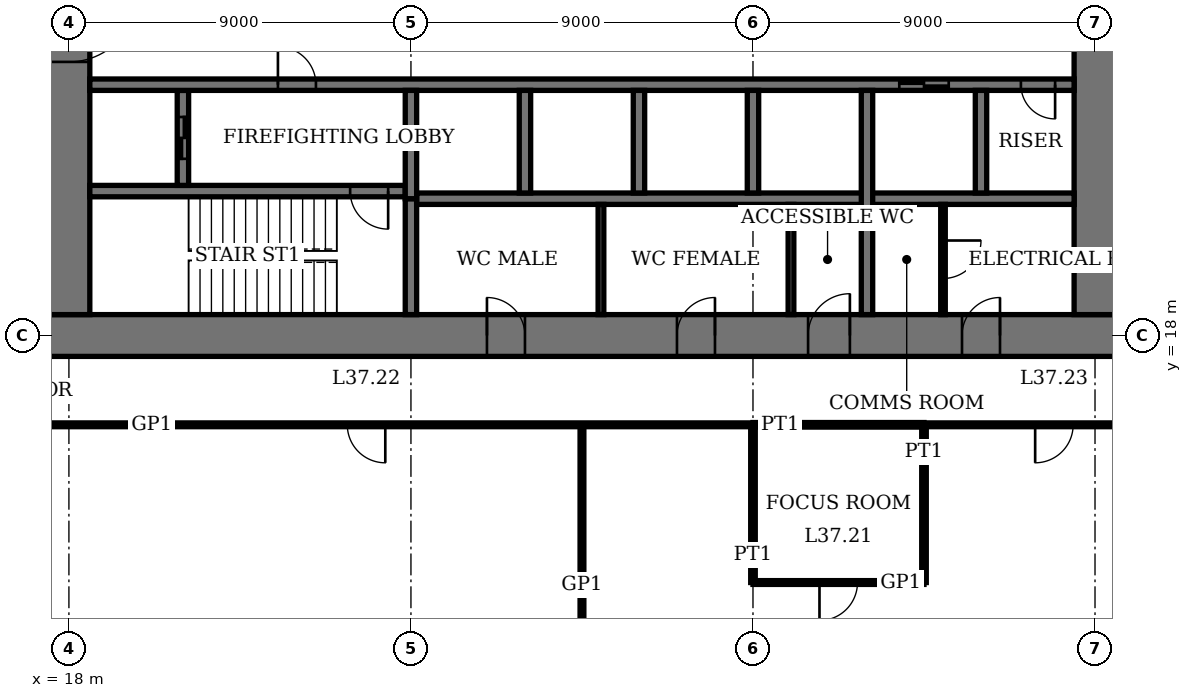
"""IFC4 building model, lengths in metres.
Left out: names, types, materials, properties, quantities, classifications, styles, units other than length and angle.
Written with IfcOpenShell. Run it as: python <this file> out.ifc"""

import sys

from ifc_helpers import new_model, si_unit, direction, frame, frame_2d, origin, place, context, subcontext, project, spatial, rectangle, extrude, element, fill, save


model = new_model("IFC4")
c1 = context("Model", 3, precision=1e-05, world=origin(), true_north=direction((0.0, 1.0)))
c2 = subcontext(c1, "Body", "Model", "MODEL_VIEW")
j1 = project(units=[si_unit("LENGTHUNIT", "METRE"), si_unit("PLANEANGLEUNIT", "RADIAN")], contexts=[c1])
p1 = place(None, origin())
s1 = spatial("IfcSite", under=j1, at=p1, CompositionType="ELEMENT")
p2 = place(p1, origin())
s2 = spatial("IfcBuilding", under=s1, at=p2, CompositionType="ELEMENT")
p3 = place(p2, frame((0.0, 0.0, 153.0)))
s3 = spatial("IfcBuildingStorey", under=s2, at=p3, CompositionType="ELEMENT", Elevation=153.0)
p4 = place(p3, frame((17.45, 18.0, 0.0), z_axis=(0.0, 0.0, 1.0), x_axis=(1.0, 0.0, 0.0)))
e1 = element("IfcWall", 1, at=p4, inside=s3, PredefinedType="SHEAR", context=c2, shape_type="SweptSolid", body=[
    extrude(rectangle(XDim=28.1, YDim=1.1, at=frame_2d((14.05, 0.0))), origin(), (0.0, 0.0, 1.0), 4.2),
])
p5 = place(p4, frame((11.55, 0.0, 0.0)))
e2 = element("IfcOpeningElement", 2, at=p5, cuts=e1, PredefinedType="OPENING", context=c2, shape_type="SweptSolid", body=[
    extrude(rectangle(XDim=1.0, YDim=2.4, at=frame_2d((0.5, 1.2))), frame((0.0, 0.56, 0.0), z_axis=(0.0, -1.0, 0.0), x_axis=(1.0, 0.0, 0.0)), (0.0, 0.0, 1.0), 1.12),
])
p6 = place(p4, frame((16.55, 0.0, 0.0)))
e3 = element("IfcOpeningElement", 3, at=p6, cuts=e1, PredefinedType="OPENING", context=c2, shape_type="SweptSolid", body=[
    extrude(rectangle(XDim=1.0, YDim=2.4, at=frame_2d((0.5, 1.2))), frame((0.0, 0.56, 0.0), z_axis=(0.0, -1.0, 0.0), x_axis=(1.0, 0.0, 0.0)), (0.0, 0.0, 1.0), 1.12),
])
p7 = place(p4, frame((20.0, 0.0, 0.0)))
e4 = element("IfcOpeningElement", 4, at=p7, cuts=e1, PredefinedType="OPENING", context=c2, shape_type="SweptSolid", body=[
    extrude(rectangle(XDim=1.1, YDim=2.4, at=frame_2d((0.55, 1.2))), frame((0.0, 0.56, 0.0), z_axis=(0.0, -1.0, 0.0), x_axis=(1.0, 0.0, 0.0)), (0.0, 0.0, 1.0), 1.12),
])
p8 = place(p4, frame((24.05, 0.0, 0.0)))
e5 = element("IfcOpeningElement", 5, at=p8, cuts=e1, PredefinedType="OPENING", context=c2, shape_type="SweptSolid", body=[
    extrude(rectangle(XDim=1.0, YDim=2.4, at=frame_2d((0.5, 1.2))), frame((0.0, 0.56, 0.0), z_axis=(0.0, -1.0, 0.0), x_axis=(1.0, 0.0, 0.0)), (0.0, 0.0, 1.0), 1.12),
])
p9 = place(p3, frame((18.0, 35.45, 0.0), z_axis=(0.0, 0.0, 1.0), x_axis=(0.0, -1.0, 0.0)))
e6 = element("IfcWall", 6, at=p9, inside=s3, PredefinedType="SHEAR", context=c2, shape_type="SweptSolid", body=[
    extrude(rectangle(XDim=16.9, YDim=1.1, at=frame_2d((8.45, 0.0))), origin(), (0.0, 0.0, 1.0), 4.2),
])
p10 = place(p9, frame((8.45, 0.0, 0.0)))
e7 = element("IfcOpeningElement", 7, at=p10, cuts=e6, PredefinedType="OPENING", context=c2, shape_type="SweptSolid", body=[
    extrude(rectangle(XDim=1.8, YDim=2.4, at=frame_2d((0.9, 1.2))), frame((0.0, 0.56, 0.0), z_axis=(0.0, -1.0, 0.0), x_axis=(1.0, 0.0, 0.0)), (0.0, 0.0, 1.0), 1.12),
])
p11 = place(p3, frame((45.0, 18.55, 0.0), z_axis=(0.0, 0.0, 1.0), x_axis=(0.0, 1.0, 0.0)))
e8 = element("IfcWall", 8, at=p11, inside=s3, PredefinedType="SHEAR", context=c2, shape_type="SweptSolid", body=[
    extrude(rectangle(XDim=16.9, YDim=1.1, at=frame_2d((8.45, 0.0))), origin(), (0.0, 0.0, 1.0), 4.2),
])
p12 = place(p11, frame((8.45, 0.0, 0.0)))
e9 = element("IfcOpeningElement", 9, at=p12, cuts=e8, PredefinedType="OPENING", context=c2, shape_type="SweptSolid", body=[
    extrude(rectangle(XDim=1.8, YDim=2.4, at=frame_2d((0.9, 1.2))), frame((0.0, 0.56, 0.0), z_axis=(0.0, -1.0, 0.0), x_axis=(1.0, 0.0, 0.0)), (0.0, 0.0, 1.0), 1.12),
])
p13 = place(p3, frame((18.55, 21.8, 0.0), z_axis=(0.0, 0.0, 1.0), x_axis=(1.0, 0.0, 0.0)))
e10 = element("IfcWall", 10, at=p13, inside=s3, PredefinedType="SHEAR", context=c2, shape_type="SweptSolid", body=[
    extrude(rectangle(XDim=8.3, YDim=0.3, at=frame_2d((4.15, 0.0))), origin(), (0.0, 0.0, 1.0), 4.2),
])
p14 = place(p13, frame((6.85, 0.0, 0.0)))
e11 = element("IfcOpeningElement", 11, at=p14, cuts=e10, PredefinedType="OPENING", context=c2, shape_type="SweptSolid", body=[
    extrude(rectangle(XDim=1.0, YDim=2.4, at=frame_2d((0.5, 1.2))), frame((0.0, 0.16, 0.0), z_axis=(0.0, -1.0, 0.0), x_axis=(1.0, 0.0, 0.0)), (0.0, 0.0, 1.0), 0.32),
])
p15 = place(p3, frame((27.0, 18.55, 0.0), z_axis=(0.0, 0.0, 1.0), x_axis=(0.0, 1.0, 0.0)))
e12 = element("IfcWall", 12, at=p15, inside=s3, PredefinedType="SHEAR", context=c2, shape_type="SweptSolid", body=[
    extrude(rectangle(XDim=3.05, YDim=0.3, at=frame_2d((1.525, 0.0))), origin(), (0.0, 0.0, 1.0), 4.2),
])
p16 = place(p3, frame((21.0, 21.95, 0.0), z_axis=(0.0, 0.0, 1.0), x_axis=(0.0, 1.0, 0.0)))
e13 = element("IfcWall", 13, at=p16, inside=s3, PredefinedType="SHEAR", context=c2, shape_type="SweptSolid", body=[
    extrude(rectangle(XDim=2.5, YDim=0.3, at=frame_2d((1.25, 0.0))), origin(), (0.0, 0.0, 1.0), 4.2),
])
p17 = place(p16, frame((0.7, 0.0, 0.0)))
e14 = element("IfcOpeningElement", 14, at=p17, cuts=e13, PredefinedType="OPENING", context=c2, shape_type="SweptSolid", body=[
    extrude(rectangle(XDim=1.1, YDim=2.4, at=frame_2d((0.55, 1.2))), frame((0.0, 0.16, 0.0), z_axis=(0.0, -1.0, 0.0), x_axis=(1.0, 0.0, 0.0)), (0.0, 0.0, 1.0), 0.32),
])
p18 = place(p3, frame((18.55, 24.6, 0.0), z_axis=(0.0, 0.0, 1.0), x_axis=(1.0, 0.0, 0.0)))
e15 = element("IfcWall", 15, at=p18, inside=s3, PredefinedType="SHEAR", context=c2, shape_type="SweptSolid", body=[
    extrude(rectangle(XDim=25.9, YDim=0.3, at=frame_2d((12.95, 0.0))), origin(), (0.0, 0.0, 1.0), 4.2),
])
p19 = place(p18, frame((4.95, 0.0, 0.0)))
e16 = element("IfcOpeningElement", 16, at=p19, cuts=e15, PredefinedType="OPENING", context=c2, shape_type="SweptSolid", body=[
    extrude(rectangle(XDim=1.0, YDim=2.4, at=frame_2d((0.5, 1.2))), frame((0.0, 0.16, 0.0), z_axis=(0.0, -1.0, 0.0), x_axis=(1.0, 0.0, 0.0)), (0.0, 0.0, 1.0), 0.32),
])
p20 = place(p18, frame((24.5, 0.0, 0.0)))
e17 = element("IfcOpeningElement", 17, at=p20, cuts=e15, PredefinedType="OPENING", context=c2, shape_type="SweptSolid", body=[
    extrude(rectangle(XDim=0.9, YDim=2.1, at=frame_2d((0.45, 1.05))), frame((0.0, 0.16, 0.0), z_axis=(0.0, -1.0, 0.0), x_axis=(1.0, 0.0, 0.0)), (0.0, 0.0, 1.0), 0.32),
])
p21 = place(p18, frame((21.3, 0.0, 0.0)))
e18 = element("IfcOpeningElement", 18, at=p21, cuts=e15, PredefinedType="OPENING", context=c2, shape_type="SweptSolid", body=[
    extrude(rectangle(XDim=1.3, YDim=2.4, at=frame_2d((0.65, 1.2))), frame((0.0, 0.16, 0.0), z_axis=(0.0, -1.0, 0.0), x_axis=(1.0, 0.0, 0.0)), (0.0, 0.0, 1.0), 0.32),
])
p22 = place(p3, frame((27.15, 21.6, 0.0), z_axis=(0.0, 0.0, 1.0), x_axis=(1.0, 0.0, 0.0)))
e19 = element("IfcWall", 19, at=p22, inside=s3, PredefinedType="SHEAR", context=c2, shape_type="SweptSolid", body=[
    extrude(rectangle(XDim=17.3, YDim=0.3, at=frame_2d((8.65, 0.0))), origin(), (0.0, 0.0, 1.0), 4.2),
])
for number, where, z_axis, x_axis in (
    (20, (30.0, 21.75, 0.0), (0.0, 0.0, 1.0), (0.0, 1.0, 0.0)),
    (21, (33.0, 21.75, 0.0), (0.0, 0.0, 1.0), (0.0, 1.0, 0.0)),
    (22, (36.0, 21.75, 0.0), (0.0, 0.0, 1.0), (0.0, 1.0, 0.0)),
):
    element("IfcWall", number, at=place(p3, frame(where, z_axis=z_axis, x_axis=x_axis)), inside=s3, PredefinedType="SHEAR", context=c2, shape_type="SweptSolid", body=[
        extrude(rectangle(XDim=2.7, YDim=0.3, at=frame_2d((1.35, 0.0))), origin(), (0.0, 0.0, 1.0), 4.2),
    ])
p23 = place(p3, frame((39.0, 18.55, 0.0), z_axis=(0.0, 0.0, 1.0), x_axis=(0.0, 1.0, 0.0)))
e23 = element("IfcWall", 23, at=p23, inside=s3, PredefinedType="SHEAR", context=c2, shape_type="SweptSolid", body=[
    extrude(rectangle(XDim=5.9, YDim=0.3, at=frame_2d((2.95, 0.0))), origin(), (0.0, 0.0, 1.0), 4.2),
])
p24 = place(p3, frame((42.0, 21.75, 0.0), z_axis=(0.0, 0.0, 1.0), x_axis=(0.0, 1.0, 0.0)))
e24 = element("IfcWall", 24, at=p24, inside=s3, PredefinedType="SHEAR", context=c2, shape_type="SweptSolid", body=[
    extrude(rectangle(XDim=2.7, YDim=0.3, at=frame_2d((1.35, 0.0))), origin(), (0.0, 0.0, 1.0), 4.2),
])
p25 = place(p3, frame((27.0, 21.6, 0.0), z_axis=(0.0, 0.0, 1.0), x_axis=(0.0, 1.0, 0.0)))
e25 = element("IfcWall", 25, at=p25, inside=s3, PredefinedType="SHEAR", context=c2, shape_type="SweptSolid", body=[
    extrude(rectangle(XDim=2.85, YDim=0.3, at=frame_2d((1.425, 0.0))), origin(), (0.0, 0.0, 1.0), 4.2),
])
p26 = place(p3, frame((36.0, 11.5, 0.0), z_axis=(0.0, 0.0, 1.0), x_axis=(1.0, 0.0, 0.0)))
e26 = element("IfcWall", 26, at=p26, inside=s3, PredefinedType="PARTITIONING", context=c2, shape_type="SweptSolid", body=[
    extrude(rectangle(XDim=4.5, YDim=0.1, at=frame_2d((2.25, 0.0))), origin(), (0.0, 0.0, 1.0), 3.85),
])
p27 = place(p26, frame((1.75, 0.0, 0.0)))
e27 = element("IfcOpeningElement", 27, at=p27, cuts=e26, PredefinedType="OPENING", context=c2, shape_type="SweptSolid", body=[
    extrude(rectangle(XDim=1.0, YDim=2.4, at=frame_2d((0.5, 1.2))), frame((0.0, 0.06, 0.0), z_axis=(0.0, -1.0, 0.0), x_axis=(1.0, 0.0, 0.0)), (0.0, 0.0, 1.0), 0.12),
])
p28 = place(p3, frame((36.0, 15.65, 0.0), z_axis=(0.0, 0.0, 1.0), x_axis=(1.0, 0.0, 0.0)))
e28 = element("IfcWall", 28, at=p28, inside=s3, PredefinedType="PARTITIONING", context=c2, shape_type="SweptSolid", body=[
    extrude(rectangle(XDim=4.5, YDim=0.12, at=frame_2d((2.25, 0.0))), origin(), (0.0, 0.0, 1.0), 3.85),
])
p29 = place(p3, frame((15.65, 15.65, 0.0), z_axis=(0.0, 0.0, 1.0), x_axis=(1.0, 0.0, 0.0)))
e29 = element("IfcWall", 29, at=p29, inside=s3, PredefinedType="PARTITIONING", context=c2, shape_type="SweptSolid", body=[
    extrude(rectangle(XDim=20.35, YDim=0.1, at=frame_2d((10.175, 0.0))), origin(), (0.0, 0.0, 1.0), 3.85),
])
p30 = place(p29, frame((9.675, 0.0, 0.0)))
e30 = element("IfcOpeningElement", 30, at=p30, cuts=e29, PredefinedType="OPENING", context=c2, shape_type="SweptSolid", body=[
    extrude(rectangle(XDim=1.0, YDim=2.4, at=frame_2d((0.5, 1.2))), frame((0.0, 0.06, 0.0), z_axis=(0.0, -1.0, 0.0), x_axis=(1.0, 0.0, 0.0)), (0.0, 0.0, 1.0), 0.12),
])
p31 = place(p3, frame((40.5, 15.65, 0.0), z_axis=(0.0, 0.0, 1.0), x_axis=(1.0, 0.0, 0.0)))
e31 = element("IfcWall", 31, at=p31, inside=s3, PredefinedType="PARTITIONING", context=c2, shape_type="SweptSolid", body=[
    extrude(rectangle(XDim=6.85, YDim=0.1, at=frame_2d((3.425, 0.0))), origin(), (0.0, 0.0, 1.0), 3.85),
])
p32 = place(p31, frame((2.925, 0.0, 0.0)))
e32 = element("IfcOpeningElement", 32, at=p32, cuts=e31, PredefinedType="OPENING", context=c2, shape_type="SweptSolid", body=[
    extrude(rectangle(XDim=1.0, YDim=2.4, at=frame_2d((0.5, 1.2))), frame((0.0, 0.06, 0.0), z_axis=(0.0, -1.0, 0.0), x_axis=(1.0, 0.0, 0.0)), (0.0, 0.0, 1.0), 0.12),
])
p33 = place(p3, frame((31.5, 7.2, 0.0), z_axis=(0.0, 0.0, 1.0), x_axis=(0.0, 1.0, 0.0)))
e33 = element("IfcWall", 33, at=p33, inside=s3, PredefinedType="PARTITIONING", context=c2, shape_type="SweptSolid", body=[
    extrude(rectangle(XDim=8.45, YDim=0.1, at=frame_2d((4.225, 0.0))), origin(), (0.0, 0.0, 1.0), 3.85),
])
p34 = place(p3, frame((36.0, 11.5, 0.0), z_axis=(0.0, 0.0, 1.0), x_axis=(0.0, 1.0, 0.0)))
e34 = element("IfcWall", 34, at=p34, inside=s3, PredefinedType="PARTITIONING", context=c2, shape_type="SweptSolid", body=[
    extrude(rectangle(XDim=4.15, YDim=0.12, at=frame_2d((2.075, 0.0))), origin(), (0.0, 0.0, 1.0), 3.25),
])
p35 = place(p3, frame((40.5, 11.5, 0.0), z_axis=(0.0, 0.0, 1.0), x_axis=(0.0, 1.0, 0.0)))
e35 = element("IfcWall", 35, at=p35, inside=s3, PredefinedType="PARTITIONING", context=c2, shape_type="SweptSolid", body=[
    extrude(rectangle(XDim=4.15, YDim=0.12, at=frame_2d((2.075, 0.0))), origin(), (0.0, 0.0, 1.0), 3.85),
])
for number, where, z_axis, x_axis in (
    (36, (32.0, 18.55, 0.0), (0.0, 0.0, 1.0), (0.0, 1.0, 0.0)),
    (37, (37.0, 18.55, 0.0), (0.0, 0.0, 1.0), (0.0, 1.0, 0.0)),
):
    element("IfcWall", number, at=place(p3, frame(where, z_axis=z_axis, x_axis=x_axis)), inside=s3, PredefinedType="PARTITIONING", context=c2, shape_type="SweptSolid", body=[
        extrude(rectangle(XDim=2.9, YDim=0.15, at=frame_2d((1.45, 0.0))), origin(), (0.0, 0.0, 1.0), 3.85),
    ])
p36 = place(p3, frame((41.0, 18.55, 0.0), z_axis=(0.0, 0.0, 1.0), x_axis=(0.0, 1.0, 0.0)))
e38 = element("IfcWall", 38, at=p36, inside=s3, PredefinedType="PARTITIONING", context=c2, shape_type="SweptSolid", body=[
    extrude(rectangle(XDim=2.9, YDim=0.12, at=frame_2d((1.45, 0.0))), origin(), (0.0, 0.0, 1.0), 3.85),
])
p37 = place(p36, frame((0.95, 0.0, 0.0)))
e39 = element("IfcOpeningElement", 39, at=p37, cuts=e38, PredefinedType="OPENING", context=c2, shape_type="SweptSolid", body=[
    extrude(rectangle(XDim=1.0, YDim=2.4, at=frame_2d((0.5, 1.2))), frame((0.0, 0.07, 0.0), z_axis=(0.0, -1.0, 0.0), x_axis=(1.0, 0.0, 0.0)), (0.0, 0.0, 1.0), 0.14),
])
p38 = place(p10, origin())
e40 = element("IfcDoor", 40, at=p38, inside=s3, OperationType="DOUBLE_DOOR_DOUBLE_SWING", PredefinedType="DOOR", context=c2, shape_type="SweptSolid", body=[
    extrude(rectangle(XDim=1.8, YDim=2.4, at=frame_2d((0.9, 1.2))), frame((0.0, 0.03, 0.0), z_axis=(0.0, -1.0, 0.0), x_axis=(1.0, 0.0, 0.0)), (0.0, 0.0, 1.0), 0.06),
    extrude(rectangle(XDim=0.04, YDim=2.4, at=frame_2d((0.02, 1.2))), frame((0.0, 0.55, 0.0), z_axis=(0.0, -1.0, 0.0), x_axis=(1.0, 0.0, 0.0)), (0.0, 0.0, 1.0), 1.1),
    extrude(rectangle(XDim=0.04, YDim=2.4, at=frame_2d((1.78, 1.2))), frame((0.0, 0.55, 0.0), z_axis=(0.0, -1.0, 0.0), x_axis=(1.0, 0.0, 0.0)), (0.0, 0.0, 1.0), 1.1),
    extrude(rectangle(XDim=1.8, YDim=0.04, at=frame_2d((0.9, 2.38))), frame((0.0, 0.55, 0.0), z_axis=(0.0, -1.0, 0.0), x_axis=(1.0, 0.0, 0.0)), (0.0, 0.0, 1.0), 1.1),
])
fill(e7, e40)
p39 = place(p5, origin())
e41 = element("IfcDoor", 41, at=p39, inside=s3, OperationType="SINGLE_SWING_RIGHT", PredefinedType="DOOR", context=c2, shape_type="SweptSolid", body=[
    extrude(rectangle(XDim=1.0, YDim=2.4, at=frame_2d((0.5, 1.2))), frame((0.0, 0.025, 0.0), z_axis=(0.0, -1.0, 0.0), x_axis=(1.0, 0.0, 0.0)), (0.0, 0.0, 1.0), 0.05),
    extrude(rectangle(XDim=0.04, YDim=2.4, at=frame_2d((0.02, 1.2))), frame((0.0, 0.4, 0.0), z_axis=(0.0, -1.0, 0.0), x_axis=(1.0, 0.0, 0.0)), (0.0, 0.0, 1.0), 0.8),
    extrude(rectangle(XDim=0.04, YDim=2.4, at=frame_2d((0.98, 1.2))), frame((0.0, 0.4, 0.0), z_axis=(0.0, -1.0, 0.0), x_axis=(1.0, 0.0, 0.0)), (0.0, 0.0, 1.0), 0.8),
    extrude(rectangle(XDim=1.0, YDim=0.04, at=frame_2d((0.5, 2.38))), frame((0.0, 0.4, 0.0), z_axis=(0.0, -1.0, 0.0), x_axis=(1.0, 0.0, 0.0)), (0.0, 0.0, 1.0), 0.8),
])
fill(e2, e41)
p40 = place(p6, origin())
e42 = element("IfcDoor", 42, at=p40, inside=s3, OperationType="SINGLE_SWING_LEFT", PredefinedType="DOOR", context=c2, shape_type="SweptSolid", body=[
    extrude(rectangle(XDim=1.0, YDim=2.4, at=frame_2d((0.5, 1.2))), frame((0.0, 0.025, 0.0), z_axis=(0.0, -1.0, 0.0), x_axis=(1.0, 0.0, 0.0)), (0.0, 0.0, 1.0), 0.05),
    extrude(rectangle(XDim=0.04, YDim=2.4, at=frame_2d((0.02, 1.2))), frame((0.0, 0.4, 0.0), z_axis=(0.0, -1.0, 0.0), x_axis=(1.0, 0.0, 0.0)), (0.0, 0.0, 1.0), 0.8),
    extrude(rectangle(XDim=0.04, YDim=2.4, at=frame_2d((0.98, 1.2))), frame((0.0, 0.4, 0.0), z_axis=(0.0, -1.0, 0.0), x_axis=(1.0, 0.0, 0.0)), (0.0, 0.0, 1.0), 0.8),
    extrude(rectangle(XDim=1.0, YDim=0.04, at=frame_2d((0.5, 2.38))), frame((0.0, 0.4, 0.0), z_axis=(0.0, -1.0, 0.0), x_axis=(1.0, 0.0, 0.0)), (0.0, 0.0, 1.0), 0.8),
])
fill(e3, e42)
p41 = place(p7, origin())
e43 = element("IfcDoor", 43, at=p41, inside=s3, OperationType="SINGLE_SWING_LEFT", PredefinedType="DOOR", context=c2, shape_type="SweptSolid", body=[
    extrude(rectangle(XDim=1.1, YDim=2.4, at=frame_2d((0.55, 1.2))), frame((0.0, 0.025, 0.0), z_axis=(0.0, -1.0, 0.0), x_axis=(1.0, 0.0, 0.0)), (0.0, 0.0, 1.0), 0.05),
    extrude(rectangle(XDim=0.04, YDim=2.4, at=frame_2d((0.02, 1.2))), frame((0.0, 0.44, 0.0), z_axis=(0.0, -1.0, 0.0), x_axis=(1.0, 0.0, 0.0)), (0.0, 0.0, 1.0), 0.88),
    extrude(rectangle(XDim=0.04, YDim=2.4, at=frame_2d((1.08, 1.2))), frame((0.0, 0.44, 0.0), z_axis=(0.0, -1.0, 0.0), x_axis=(1.0, 0.0, 0.0)), (0.0, 0.0, 1.0), 0.88),
    extrude(rectangle(XDim=1.1, YDim=0.04, at=frame_2d((0.55, 2.38))), frame((0.0, 0.44, 0.0), z_axis=(0.0, -1.0, 0.0), x_axis=(1.0, 0.0, 0.0)), (0.0, 0.0, 1.0), 0.88),
])
fill(e4, e43)
p42 = place(p8, origin())
e44 = element("IfcDoor", 44, at=p42, inside=s3, OperationType="SINGLE_SWING_LEFT", PredefinedType="DOOR", context=c2, shape_type="SweptSolid", body=[
    extrude(rectangle(XDim=1.0, YDim=2.4, at=frame_2d((0.5, 1.2))), frame((0.0, 0.025, 0.0), z_axis=(0.0, -1.0, 0.0), x_axis=(1.0, 0.0, 0.0)), (0.0, 0.0, 1.0), 0.05),
    extrude(rectangle(XDim=0.04, YDim=2.4, at=frame_2d((0.02, 1.2))), frame((0.0, 0.4, 0.0), z_axis=(0.0, -1.0, 0.0), x_axis=(1.0, 0.0, 0.0)), (0.0, 0.0, 1.0), 0.8),
    extrude(rectangle(XDim=0.04, YDim=2.4, at=frame_2d((0.98, 1.2))), frame((0.0, 0.4, 0.0), z_axis=(0.0, -1.0, 0.0), x_axis=(1.0, 0.0, 0.0)), (0.0, 0.0, 1.0), 0.8),
    extrude(rectangle(XDim=1.0, YDim=0.04, at=frame_2d((0.5, 2.38))), frame((0.0, 0.4, 0.0), z_axis=(0.0, -1.0, 0.0), x_axis=(1.0, 0.0, 0.0)), (0.0, 0.0, 1.0), 0.8),
])
fill(e5, e44)
p43 = place(p14, origin())
e45 = element("IfcDoor", 45, at=p43, inside=s3, OperationType="SINGLE_SWING_RIGHT", PredefinedType="DOOR", context=c2, shape_type="SweptSolid", body=[
    extrude(rectangle(XDim=1.0, YDim=2.4, at=frame_2d((0.5, 1.2))), frame((0.0, 0.03, 0.0), z_axis=(0.0, -1.0, 0.0), x_axis=(1.0, 0.0, 0.0)), (0.0, 0.0, 1.0), 0.06),
])
fill(e11, e45)
p44 = place(p19, origin())
e46 = element("IfcDoor", 46, at=p44, inside=s3, OperationType="SINGLE_SWING_RIGHT", PredefinedType="DOOR", context=c2, shape_type="SweptSolid", body=[
    extrude(rectangle(XDim=1.0, YDim=2.4, at=frame_2d((0.5, 1.2))), frame((0.0, 0.03, 0.0), z_axis=(0.0, -1.0, 0.0), x_axis=(1.0, 0.0, 0.0)), (0.0, 0.0, 1.0), 0.06),
])
fill(e16, e46)
p45 = place(p20, origin())
e47 = element("IfcDoor", 47, at=p45, inside=s3, OperationType="SINGLE_SWING_RIGHT", PredefinedType="DOOR", context=c2, shape_type="SweptSolid", body=[
    extrude(rectangle(XDim=0.9, YDim=2.1, at=frame_2d((0.45, 1.05))), frame((0.0, 0.03, 0.0), z_axis=(0.0, -1.0, 0.0), x_axis=(1.0, 0.0, 0.0)), (0.0, 0.0, 1.0), 0.06),
])
fill(e17, e47)
p46 = place(p27, origin())
e48 = element("IfcDoor", 48, at=p46, inside=s3, OperationType="SINGLE_SWING_LEFT", PredefinedType="DOOR", context=c2, shape_type="SweptSolid", body=[
    extrude(rectangle(XDim=1.0, YDim=2.4, at=frame_2d((0.5, 1.2))), frame((0.0, 0.02, 0.0), z_axis=(0.0, -1.0, 0.0), x_axis=(1.0, 0.0, 0.0)), (0.0, 0.0, 1.0), 0.04),
])
fill(e27, e48)
p47 = place(p30, origin())
e49 = element("IfcDoor", 49, at=p47, inside=s3, OperationType="SINGLE_SWING_RIGHT", PredefinedType="DOOR", context=c2, shape_type="SweptSolid", body=[
    extrude(rectangle(XDim=1.0, YDim=2.4, at=frame_2d((0.5, 1.2))), frame((0.0, 0.02, 0.0), z_axis=(0.0, -1.0, 0.0), x_axis=(1.0, 0.0, 0.0)), (0.0, 0.0, 1.0), 0.04),
])
fill(e30, e49)
p48 = place(p32, origin())
e50 = element("IfcDoor", 50, at=p48, inside=s3, OperationType="SINGLE_SWING_LEFT", PredefinedType="DOOR", context=c2, shape_type="SweptSolid", body=[
    extrude(rectangle(XDim=1.0, YDim=2.4, at=frame_2d((0.5, 1.2))), frame((0.0, 0.02, 0.0), z_axis=(0.0, -1.0, 0.0), x_axis=(1.0, 0.0, 0.0)), (0.0, 0.0, 1.0), 0.04),
])
fill(e32, e50)
p49 = place(p37, origin())
e51 = element("IfcDoor", 51, at=p49, inside=s3, OperationType="SINGLE_SWING_RIGHT", PredefinedType="DOOR", context=c2, shape_type="SweptSolid", body=[
    extrude(rectangle(XDim=1.0, YDim=2.4, at=frame_2d((0.5, 1.2))), frame((0.0, 0.03, 0.0), z_axis=(0.0, -1.0, 0.0), x_axis=(1.0, 0.0, 0.0)), (0.0, 0.0, 1.0), 0.06),
])
fill(e39, e51)
p50 = place(p21, origin())
e52 = element("IfcDoor", 52, at=p50, inside=s3, OperationType="DOUBLE_DOOR_SLIDING", PredefinedType="DOOR", context=c2, shape_type="SweptSolid", body=[
    extrude(rectangle(XDim=1.3, YDim=2.4, at=frame_2d((0.65, 1.2))), frame((0.0, 0.02, 0.0), z_axis=(0.0, -1.0, 0.0), x_axis=(1.0, 0.0, 0.0)), (0.0, 0.0, 1.0), 0.04),
])
fill(e18, e52)
p51 = place(p17, origin())
e53 = element("IfcDoor", 53, at=p51, inside=s3, OperationType="DOUBLE_DOOR_SLIDING", PredefinedType="DOOR", context=c2, shape_type="SweptSolid", body=[
    extrude(rectangle(XDim=1.1, YDim=2.4, at=frame_2d((0.55, 1.2))), frame((0.0, 0.03, 0.0), z_axis=(0.0, -1.0, 0.0), x_axis=(1.0, 0.0, 0.0)), (0.0, 0.0, 1.0), 0.06),
])
fill(e14, e53)
save(model, sys.argv[1])
